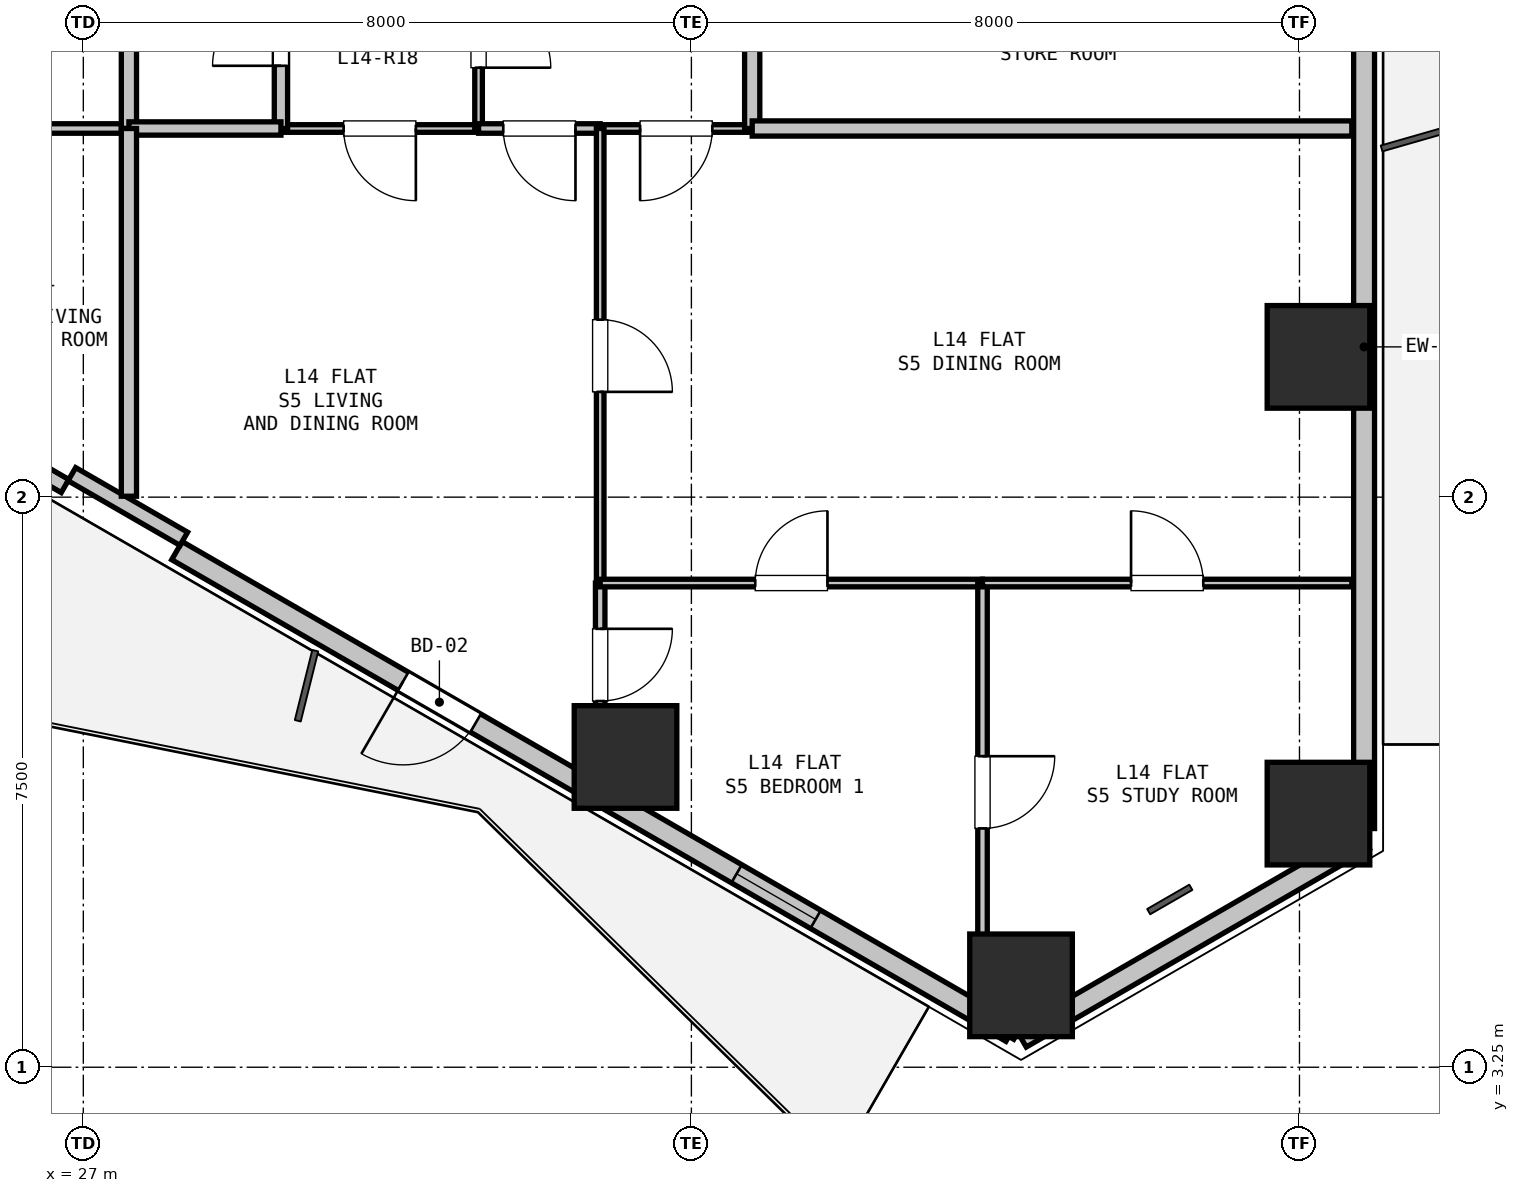
"""IFC4 building model, lengths in metres.
Left out: names, types, materials, properties, quantities, classifications, styles, units other than length and angle.
Written with IfcOpenShell. Run it as: python <this file> out.ifc"""

import sys

from ifc_helpers import new_model, si_unit, direction, frame, frame_2d, origin, origin_2d, place, context, subcontext, project, spatial, rectangle, hollow_rectangle, extrude, element, fill, save


model = new_model("IFC4")
c1 = context("Model", 3, precision=1e-05, world=origin(), true_north=direction((0.0, 1.0)))
c2 = subcontext(c1, "Body", "Model", "MODEL_VIEW")
j1 = project(units=[si_unit("LENGTHUNIT", "METRE"), si_unit("PLANEANGLEUNIT", "RADIAN")], contexts=[c1])
p1 = place(None, origin())
s1 = spatial("IfcSite", under=j1, at=p1, CompositionType="ELEMENT")
p2 = place(p1, origin())
s2 = spatial("IfcBuilding", under=s1, at=p2, CompositionType="ELEMENT")
p3 = place(p2, frame((0.0, 0.0, 52.2)))
s3 = spatial("IfcBuildingStorey", under=s2, at=p3, CompositionType="ELEMENT", Elevation=52.2)
for number, where, z_axis, x_axis in (
    (1, (43.25, 12.595, 0.0), (0.0, 0.0, 1.0), (1.0, 0.0, 0.0)),
    (2, (43.25, 6.587, 0.0), (0.0, 0.0, 1.0), (1.0, 0.0, 0.0)),
    (3, (39.337, 4.327, 0.0), (0.0, 0.0, 1.0), (1.0, 0.0, 0.0)),
    (4, (34.133, 7.332, 0.0), (0.0, 0.0, 1.0), (1.0, 0.0, 0.0)),
):
    element("IfcColumn", number, at=place(p3, frame(where, z_axis=z_axis, x_axis=x_axis)), inside=s3, PredefinedType="COLUMN", context=c2, shape_type="SweptSolid", body=[
        extrude(hollow_rectangle(XDim=1.35, YDim=1.35, WallThickness=0.036, at=origin_2d()), origin(), (0.0, 0.0, 1.0), 3.3),
    ])
p4 = place(p3, frame((43.85, 6.24, 0.0), z_axis=(0.0, 0.0, 1.0), x_axis=(-0.866043601342, -0.499968479581, 0.0)))
e5 = element("IfcWall", 5, at=p4, inside=s3, PredefinedType="SOLIDWALL", context=c2, shape_type="SweptSolid", body=[
    extrude(rectangle(XDim=5.211, YDim=0.275, at=frame_2d((2.605, 0.0))), origin(), (0.0, 0.0, 1.0), 2.66),
])
p5 = place(p3, frame((43.85, 19.063, 0.0), z_axis=(0.0, 0.0, 1.0), x_axis=(0.0, -1.0, 0.0)))
e6 = element("IfcWall", 6, at=p5, inside=s3, PredefinedType="SOLIDWALL", context=c2, shape_type="SweptSolid", body=[
    extrude(rectangle(XDim=12.673, YDim=0.275, at=frame_2d((6.336, 0.0))), origin(), (0.0, 0.0, 1.0), 2.66),
])
p6 = place(p3, frame((39.207, 3.71, 0.0), z_axis=(0.0, 0.0, 1.0), x_axis=(-0.86603192154, 0.499988710747, 0.0)))
e7 = element("IfcWall", 7, at=p6, inside=s3, PredefinedType="SOLIDWALL", context=c2, shape_type="SweptSolid", body=[
    extrude(rectangle(XDim=12.673, YDim=0.275, at=frame_2d((6.336, 0.0))), origin(), (0.0, 0.0, 1.0), 2.66),
])
p7 = place(p6, frame((8.136, 0.0, 0.0)))
e8 = element("IfcOpeningElement", 8, at=p7, cuts=e7, PredefinedType="OPENING", context=c2, shape_type="SweptSolid", body=[
    extrude(rectangle(XDim=1.1, YDim=2.1, at=frame_2d((0.55, 1.05))), frame((0.0, 0.147, 0.0), z_axis=(0.0, -1.0, 0.0), x_axis=(1.0, 0.0, 0.0)), (0.0, 0.0, 1.0), 0.295),
])
p8 = place(p6, frame((2.971, 0.0, 0.9)))
e9 = element("IfcOpeningElement", 9, at=p8, cuts=e7, PredefinedType="OPENING", context=c2, shape_type="SweptSolid", body=[
    extrude(rectangle(XDim=1.2, YDim=1.4, at=frame_2d((0.6, 0.7))), frame((0.0, 0.147, 0.0), z_axis=(0.0, -1.0, 0.0), x_axis=(1.0, 0.0, 0.0)), (0.0, 0.0, 1.0), 0.295),
])
p9 = place(p3, frame((26.76, 10.896, 0.0), z_axis=(0.0, 0.0, 1.0), x_axis=(-0.866027351828, 0.499996625875, 0.0)))
e10 = element("IfcWall", 10, at=p9, inside=s3, PredefinedType="PARAPET", context=c2, shape_type="SweptSolid", body=[
    extrude(rectangle(XDim=11.973, YDim=0.2, at=frame_2d((5.987, 0.0))), origin(), (0.0, 0.0, 1.0), 0.2),
])
p10 = place(p3, frame((28.322, 10.202, 0.0), z_axis=(0.0, 0.0, 1.0), x_axis=(-0.86605165483, 0.499954529098, 0.0)))
e11 = element("IfcWall", 11, at=p10, inside=s3, PredefinedType="PARAPET", context=c2, shape_type="SweptSolid", body=[
    extrude(rectangle(XDim=1.7, YDim=0.2, at=frame_2d((0.85, 0.0))), origin(), (0.0, 0.0, 1.0), 2.66),
])
p11 = place(p3, frame((32.2, 15.6, 0.0), z_axis=(0.0, 0.0, 1.0), x_axis=(-1.0, 0.0, 0.0)))
e12 = element("IfcWall", 12, at=p11, inside=s3, PredefinedType="PARTITIONING", context=c2, shape_type="SweptSolid", body=[
    extrude(rectangle(XDim=2.6, YDim=0.1, at=frame_2d((1.3, 0.0))), origin(), (0.0, 0.0, 1.0), 3.04),
])
p12 = place(p11, frame((0.825, 0.0, 0.0)))
e13 = element("IfcOpeningElement", 13, at=p12, cuts=e12, PredefinedType="OPENING", context=c2, shape_type="SweptSolid", body=[
    extrude(rectangle(XDim=0.95, YDim=2.1, at=frame_2d((0.475, 1.05))), frame((0.0, 0.06, 0.0), z_axis=(0.0, -1.0, 0.0), x_axis=(1.0, 0.0, 0.0)), (0.0, 0.0, 1.0), 0.12),
])
p13 = place(p3, frame((29.6, 15.6, 0.0), z_axis=(0.0, 0.0, 1.0), x_axis=(0.0, 1.0, 0.0)))
e14 = element("IfcWall", 14, at=p13, inside=s3, PredefinedType="PLUMBINGWALL", context=c2, shape_type="SweptSolid", body=[
    extrude(rectangle(XDim=2.55, YDim=0.175, at=frame_2d((1.275, 0.0))), origin(), (0.0, 0.0, 1.0), 3.04),
])
p14 = place(p13, frame((0.825, 0.0, 0.0)))
e15 = element("IfcOpeningElement", 15, at=p14, cuts=e14, PredefinedType="OPENING", context=c2, shape_type="SweptSolid", body=[
    extrude(rectangle(XDim=0.9, YDim=2.1, at=frame_2d((0.45, 1.05))), frame((0.0, 0.097, 0.0), z_axis=(0.0, -1.0, 0.0), x_axis=(1.0, 0.0, 0.0)), (0.0, 0.0, 1.0), 0.195),
])
p15 = place(p3, frame((32.2, 18.15, 0.0), z_axis=(0.0, 0.0, 1.0), x_axis=(0.0, -1.0, 0.0)))
e16 = element("IfcWall", 16, at=p15, inside=s3, PredefinedType="PARTITIONING", context=c2, shape_type="SweptSolid", body=[
    extrude(rectangle(XDim=2.55, YDim=0.1, at=frame_2d((1.275, 0.0))), origin(), (0.0, 0.0, 1.0), 3.04),
])
p16 = place(p15, frame((0.8, 0.0, 0.0)))
e17 = element("IfcOpeningElement", 17, at=p16, cuts=e16, PredefinedType="OPENING", context=c2, shape_type="SweptSolid", body=[
    extrude(rectangle(XDim=0.95, YDim=2.1, at=frame_2d((0.475, 1.05))), frame((0.0, 0.06, 0.0), z_axis=(0.0, -1.0, 0.0), x_axis=(1.0, 0.0, 0.0)), (0.0, 0.0, 1.0), 0.12),
])
p17 = place(p3, frame((27.6, 15.6, 0.0), z_axis=(0.0, 0.0, 1.0), x_axis=(-1.0, 0.0, 0.0)))
e18 = element("IfcWall", 18, at=p17, inside=s3, PredefinedType="PARTITIONING", context=c2, shape_type="SweptSolid", body=[
    extrude(rectangle(XDim=3.2, YDim=0.125, at=frame_2d((1.6, 0.0))), origin(), (0.0, 0.0, 1.0), 2.338),
])
p18 = place(p17, frame((1.125, 0.0, 0.0)))
e19 = element("IfcOpeningElement", 19, at=p18, cuts=e18, PredefinedType="OPENING", context=c2, shape_type="SweptSolid", body=[
    extrude(rectangle(XDim=0.95, YDim=2.1, at=frame_2d((0.475, 1.05))), frame((0.0, 0.073, 0.0), z_axis=(0.0, -1.0, 0.0), x_axis=(1.0, 0.0, 0.0)), (0.0, 0.0, 1.0), 0.145),
])
p19 = place(p3, frame((27.6, 18.15, 0.0), z_axis=(0.0, 0.0, 1.0), x_axis=(0.0, -1.0, 0.0)))
e20 = element("IfcWall", 20, at=p19, inside=s3, PredefinedType="PARTITIONING", context=c2, shape_type="SweptSolid", body=[
    extrude(rectangle(XDim=2.55, YDim=0.2, at=frame_2d((1.275, 0.0))), origin(), (0.0, 0.0, 1.0), 3.04),
])
p20 = place(p3, frame((29.6, 15.6, 0.0), z_axis=(0.0, 0.0, 1.0), x_axis=(-1.0, 0.0, 0.0)))
e21 = element("IfcWall", 21, at=p20, inside=s3, PredefinedType="PLUMBINGWALL", context=c2, shape_type="SweptSolid", body=[
    extrude(rectangle(XDim=2.0, YDim=0.175, at=frame_2d((1.0, 0.0))), origin(), (0.0, 0.0, 1.0), 3.04),
])
p21 = place(p3, frame((35.8, 15.6, 0.0), z_axis=(0.0, 0.0, 1.0), x_axis=(-1.0, 0.0, 0.0)))
e22 = element("IfcWall", 22, at=p21, inside=s3, PredefinedType="PARTITIONING", context=c2, shape_type="SweptSolid", body=[
    extrude(rectangle(XDim=2.0, YDim=0.1, at=frame_2d((1.0, 0.0))), origin(), (0.0, 0.0, 1.0), 3.04),
])
p22 = place(p21, frame((0.525, 0.0, 0.0)))
e23 = element("IfcOpeningElement", 23, at=p22, cuts=e22, PredefinedType="OPENING", context=c2, shape_type="SweptSolid", body=[
    extrude(rectangle(XDim=0.95, YDim=2.1, at=frame_2d((0.475, 1.05))), frame((0.0, 0.06, 0.0), z_axis=(0.0, -1.0, 0.0), x_axis=(1.0, 0.0, 0.0)), (0.0, 0.0, 1.0), 0.12),
])
p23 = place(p3, frame((33.8, 15.6, 0.0), z_axis=(0.0, 0.0, 1.0), x_axis=(-1.0, 0.0, 0.0)))
e24 = element("IfcWall", 24, at=p23, inside=s3, PredefinedType="PARTITIONING", context=c2, shape_type="SweptSolid", body=[
    extrude(rectangle(XDim=1.6, YDim=0.125, at=frame_2d((0.8, 0.0))), origin(), (0.0, 0.0, 1.0), 3.04),
])
p24 = place(p23, frame((0.325, 0.0, 0.0)))
e25 = element("IfcOpeningElement", 25, at=p24, cuts=e24, PredefinedType="OPENING", context=c2, shape_type="SweptSolid", body=[
    extrude(rectangle(XDim=0.95, YDim=2.1, at=frame_2d((0.475, 1.05))), frame((0.0, 0.073, 0.0), z_axis=(0.0, -1.0, 0.0), x_axis=(1.0, 0.0, 0.0)), (0.0, 0.0, 1.0), 0.145),
])
p25 = place(p3, frame((35.8, 18.15, 0.0), z_axis=(0.0, 0.0, 1.0), x_axis=(0.0, -1.0, 0.0)))
e26 = element("IfcWall", 26, at=p25, inside=s3, PredefinedType="PARTITIONING", context=c2, shape_type="SweptSolid", body=[
    extrude(rectangle(XDim=2.55, YDim=0.2, at=frame_2d((1.275, 0.0))), origin(), (0.0, 0.0, 1.0), 3.04),
])
p26 = place(p3, frame((43.688, 15.6, 0.0), z_axis=(0.0, 0.0, 1.0), x_axis=(-1.0, 0.0, 0.0)))
e27 = element("IfcWall", 27, at=p26, inside=s3, PredefinedType="PARTITIONING", context=c2, shape_type="SweptSolid", body=[
    extrude(rectangle(XDim=7.888, YDim=0.2, at=frame_2d((3.944, 0.0))), origin(), (0.0, 0.0, 1.0), 2.338),
])
p27 = place(p3, frame((27.6, 15.6, 0.0), z_axis=(0.0, 0.0, 1.0), x_axis=(0.0, -1.0, 0.0)))
e28 = element("IfcWall", 28, at=p27, inside=s3, PredefinedType="PARTITIONING", context=c2, shape_type="SweptSolid", body=[
    extrude(rectangle(XDim=4.838, YDim=0.2, at=frame_2d((2.419, 0.0))), origin(), (0.0, 0.0, 1.0), 2.338),
])
p28 = place(p3, frame((33.8, 15.6, 0.0), z_axis=(0.0, 0.0, 1.0), x_axis=(0.0, -1.0, 0.0)))
e29 = element("IfcWall", 29, at=p28, inside=s3, PredefinedType="PARTITIONING", context=c2, shape_type="SweptSolid", body=[
    extrude(rectangle(XDim=5.98, YDim=0.1, at=frame_2d((2.99, 0.0))), origin(), (0.0, 0.0, 1.0), 3.04),
])
p29 = place(p28, frame((2.515, 0.0, 0.0)))
e30 = element("IfcOpeningElement", 30, at=p29, cuts=e29, PredefinedType="OPENING", context=c2, shape_type="SweptSolid", body=[
    extrude(rectangle(XDim=0.95, YDim=2.1, at=frame_2d((0.475, 1.05))), frame((0.0, 0.06, 0.0), z_axis=(0.0, -1.0, 0.0), x_axis=(1.0, 0.0, 0.0)), (0.0, 0.0, 1.0), 0.12),
])
p30 = place(p3, frame((33.8, 9.62, 0.0), z_axis=(0.0, 0.0, 1.0), x_axis=(0.0, -1.0, 0.0)))
e31 = element("IfcWall", 31, at=p30, inside=s3, PredefinedType="PARTITIONING", context=c2, shape_type="SweptSolid", body=[
    extrude(rectangle(XDim=2.602, YDim=0.125, at=frame_2d((1.301, 0.0))), origin(), (0.0, 0.0, 1.0), 2.338),
])
p31 = place(p30, frame((0.602, 0.0, 0.0)))
e32 = element("IfcOpeningElement", 32, at=p31, cuts=e31, PredefinedType="OPENING", context=c2, shape_type="SweptSolid", body=[
    extrude(rectangle(XDim=0.95, YDim=2.1, at=frame_2d((0.475, 1.05))), frame((0.0, 0.073, 0.0), z_axis=(0.0, -1.0, 0.0), x_axis=(1.0, 0.0, 0.0)), (0.0, 0.0, 1.0), 0.145),
])
p32 = place(p3, frame((33.8, 9.62, 0.0), z_axis=(0.0, 0.0, 1.0), x_axis=(1.0, 0.0, 0.0)))
e33 = element("IfcWall", 33, at=p32, inside=s3, PredefinedType="PARTITIONING", context=c2, shape_type="SweptSolid", body=[
    extrude(rectangle(XDim=5.03, YDim=0.1, at=frame_2d((2.515, 0.0))), origin(), (0.0, 0.0, 1.0), 3.04),
])
p33 = place(p32, frame((2.04, 0.0, 0.0)))
e34 = element("IfcOpeningElement", 34, at=p33, cuts=e33, PredefinedType="OPENING", context=c2, shape_type="SweptSolid", body=[
    extrude(rectangle(XDim=0.95, YDim=2.1, at=frame_2d((0.475, 1.05))), frame((0.0, 0.06, 0.0), z_axis=(0.0, -1.0, 0.0), x_axis=(1.0, 0.0, 0.0)), (0.0, 0.0, 1.0), 0.12),
])
p34 = place(p3, frame((38.83, 9.62, 0.0), z_axis=(0.0, 0.0, 1.0), x_axis=(0.0, -1.0, 0.0)))
e35 = element("IfcWall", 35, at=p34, inside=s3, PredefinedType="PARTITIONING", context=c2, shape_type="SweptSolid", body=[
    extrude(rectangle(XDim=5.506, YDim=0.125, at=frame_2d((2.753, 0.0))), origin(), (0.0, 0.0, 1.0), 2.65),
])
p35 = place(p34, frame((2.278, 0.0, 0.0)))
e36 = element("IfcOpeningElement", 36, at=p35, cuts=e35, PredefinedType="OPENING", context=c2, shape_type="SweptSolid", body=[
    extrude(rectangle(XDim=0.95, YDim=2.1, at=frame_2d((0.475, 1.05))), frame((0.0, 0.073, 0.0), z_axis=(0.0, -1.0, 0.0), x_axis=(1.0, 0.0, 0.0)), (0.0, 0.0, 1.0), 0.145),
])
p36 = place(p3, frame((38.83, 9.62, 0.0), z_axis=(0.0, 0.0, 1.0), x_axis=(1.0, 0.0, 0.0)))
e37 = element("IfcWall", 37, at=p36, inside=s3, PredefinedType="PARTITIONING", context=c2, shape_type="SweptSolid", body=[
    extrude(rectangle(XDim=4.858, YDim=0.1, at=frame_2d((2.429, 0.0))), origin(), (0.0, 0.0, 1.0), 2.338),
])
p37 = place(p36, frame((1.954, 0.0, 0.0)))
e38 = element("IfcOpeningElement", 38, at=p37, cuts=e37, PredefinedType="OPENING", context=c2, shape_type="SweptSolid", body=[
    extrude(rectangle(XDim=0.95, YDim=2.1, at=frame_2d((0.475, 1.05))), frame((0.0, 0.06, 0.0), z_axis=(0.0, -1.0, 0.0), x_axis=(1.0, 0.0, 0.0)), (0.0, 0.0, 1.0), 0.12),
])
p38 = place(p3, frame((39.272, 3.672, 0.0), z_axis=(0.0, 0.0, 1.0), x_axis=(-0.866442544969, 0.49927679324, 0.0)))
e39 = element("IfcWall", 39, at=p38, inside=s3, PredefinedType="PARTITIONING", context=c2, shape_type="SweptSolid", body=[
    extrude(rectangle(XDim=0.142, YDim=0.125, at=frame_2d((0.071, 0.0))), origin(), (0.0, 0.0, 1.0), 3.04),
])
p39 = place(p7, origin())
e40 = element("IfcDoor", 40, at=p39, inside=s3, OperationType="SINGLE_SWING_RIGHT", PredefinedType="DOOR", context=c2, shape_type="SweptSolid", body=[
    extrude(rectangle(XDim=1.1, YDim=2.1, at=frame_2d((0.55, 1.05))), frame((0.0, 0.025, 0.0), z_axis=(0.0, -1.0, 0.0), x_axis=(1.0, 0.0, 0.0)), (0.0, 0.0, 1.0), 0.05),
])
fill(e8, e40)
p40 = place(p8, origin())
e41 = element("IfcWindow", 41, at=p40, inside=s3, PartitioningType="SINGLE_PANEL", PredefinedType="WINDOW", context=c2, shape_type="SweptSolid", body=[
    extrude(rectangle(XDim=1.2, YDim=1.4, at=frame_2d((0.6, 0.7))), frame((0.0, 0.03, 0.0), z_axis=(0.0, -1.0, 0.0), x_axis=(1.0, 0.0, 0.0)), (0.0, 0.0, 1.0), 0.06),
])
fill(e9, e41)
p41 = place(p14, origin())
e42 = element("IfcDoor", 42, at=p41, inside=s3, OperationType="SINGLE_SWING_LEFT", PredefinedType="DOOR", context=c2, shape_type="SweptSolid", body=[
    extrude(rectangle(XDim=0.9, YDim=2.1, at=frame_2d((0.45, 1.05))), frame((0.0, 0.025, 0.0), z_axis=(0.0, -1.0, 0.0), x_axis=(1.0, 0.0, 0.0)), (0.0, 0.0, 1.0), 0.05),
])
fill(e15, e42)
p42 = place(p16, origin())
e43 = element("IfcDoor", 43, at=p42, inside=s3, OperationType="SINGLE_SWING_RIGHT", PredefinedType="DOOR", context=c2, shape_type="SweptSolid", body=[
    extrude(rectangle(XDim=0.95, YDim=2.1, at=frame_2d((0.475, 1.05))), frame((0.0, 0.025, 0.0), z_axis=(0.0, -1.0, 0.0), x_axis=(1.0, 0.0, 0.0)), (0.0, 0.0, 1.0), 0.05),
])
fill(e17, e43)
p43 = place(p12, origin())
e44 = element("IfcDoor", 44, at=p43, inside=s3, OperationType="SINGLE_SWING_LEFT", PredefinedType="DOOR", context=c2, shape_type="SweptSolid", body=[
    extrude(rectangle(XDim=0.95, YDim=2.1, at=frame_2d((0.475, 1.05))), frame((0.0, 0.025, 0.0), z_axis=(0.0, -1.0, 0.0), x_axis=(1.0, 0.0, 0.0)), (0.0, 0.0, 1.0), 0.05),
])
fill(e13, e44)
p44 = place(p24, origin())
e45 = element("IfcDoor", 45, at=p44, inside=s3, OperationType="SINGLE_SWING_LEFT", PredefinedType="DOOR", context=c2, shape_type="SweptSolid", body=[
    extrude(rectangle(XDim=0.95, YDim=2.1, at=frame_2d((0.475, 1.05))), frame((0.0, 0.025, 0.0), z_axis=(0.0, -1.0, 0.0), x_axis=(1.0, 0.0, 0.0)), (0.0, 0.0, 1.0), 0.05),
])
fill(e25, e45)
p45 = place(p22, origin())
e46 = element("IfcDoor", 46, at=p45, inside=s3, OperationType="SINGLE_SWING_RIGHT", PredefinedType="DOOR", context=c2, shape_type="SweptSolid", body=[
    extrude(rectangle(XDim=0.95, YDim=2.1, at=frame_2d((0.475, 1.05))), frame((0.0, 0.025, 0.0), z_axis=(0.0, -1.0, 0.0), x_axis=(1.0, 0.0, 0.0)), (0.0, 0.0, 1.0), 0.05),
])
fill(e23, e46)
p46 = place(p31, origin())
e47 = element("IfcDoor", 47, at=p46, inside=s3, OperationType="SINGLE_SWING_LEFT", PredefinedType="DOOR", context=c2, shape_type="SweptSolid", body=[
    extrude(rectangle(XDim=0.95, YDim=2.1, at=frame_2d((0.475, 1.05))), frame((0.0, 0.025, 0.0), z_axis=(0.0, -1.0, 0.0), x_axis=(1.0, 0.0, 0.0)), (0.0, 0.0, 1.0), 0.05),
])
fill(e32, e47)
p47 = place(p29, origin())
e48 = element("IfcDoor", 48, at=p47, inside=s3, OperationType="SINGLE_SWING_RIGHT", PredefinedType="DOOR", context=c2, shape_type="SweptSolid", body=[
    extrude(rectangle(XDim=0.95, YDim=2.1, at=frame_2d((0.475, 1.05))), frame((0.0, 0.025, 0.0), z_axis=(0.0, -1.0, 0.0), x_axis=(1.0, 0.0, 0.0)), (0.0, 0.0, 1.0), 0.05),
])
fill(e30, e48)
p48 = place(p35, origin())
e49 = element("IfcDoor", 49, at=p48, inside=s3, OperationType="SINGLE_SWING_LEFT", PredefinedType="DOOR", context=c2, shape_type="SweptSolid", body=[
    extrude(rectangle(XDim=0.95, YDim=2.1, at=frame_2d((0.475, 1.05))), frame((0.0, 0.025, 0.0), z_axis=(0.0, -1.0, 0.0), x_axis=(1.0, 0.0, 0.0)), (0.0, 0.0, 1.0), 0.05),
])
fill(e36, e49)
p49 = place(p33, origin())
e50 = element("IfcDoor", 50, at=p49, inside=s3, OperationType="SINGLE_SWING_RIGHT", PredefinedType="DOOR", context=c2, shape_type="SweptSolid", body=[
    extrude(rectangle(XDim=0.95, YDim=2.1, at=frame_2d((0.475, 1.05))), frame((0.0, 0.025, 0.0), z_axis=(0.0, -1.0, 0.0), x_axis=(1.0, 0.0, 0.0)), (0.0, 0.0, 1.0), 0.05),
])
fill(e34, e50)
p50 = place(p37, origin())
e51 = element("IfcDoor", 51, at=p50, inside=s3, OperationType="SINGLE_SWING_LEFT", PredefinedType="DOOR", context=c2, shape_type="SweptSolid", body=[
    extrude(rectangle(XDim=0.95, YDim=2.1, at=frame_2d((0.475, 1.05))), frame((0.0, 0.025, 0.0), z_axis=(0.0, -1.0, 0.0), x_axis=(1.0, 0.0, 0.0)), (0.0, 0.0, 1.0), 0.05),
])
fill(e38, e51)
save(model, sys.argv[1])
